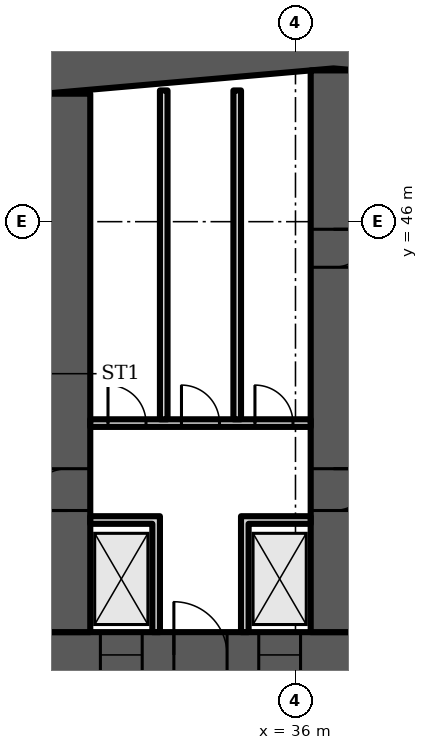
"""IFC4 building model, lengths in metres.
Left out: names, types, materials, properties, quantities, classifications, styles, units other than length and angle.
Written with IfcOpenShell. Run it as: python <this file> out.ifc"""

import sys

from ifc_helpers import new_model, si_unit, direction, frame, frame_2d, origin, place, context, subcontext, project, spatial, polyline, rectangle, outline, extrude, element, fill, save


model = new_model("IFC4")
c1 = context("Model", 3, precision=1e-05, world=origin(), true_north=direction((0.0, 1.0)))
c2 = subcontext(c1, "Body", "Model", "MODEL_VIEW")
j1 = project(units=[si_unit("LENGTHUNIT", "METRE"), si_unit("PLANEANGLEUNIT", "RADIAN")], contexts=[c1])
p1 = place(None, origin())
s1 = spatial("IfcSite", under=j1, at=p1, CompositionType="ELEMENT")
p2 = place(p1, origin())
s2 = spatial("IfcBuilding", under=s1, at=p2, CompositionType="ELEMENT")
p3 = place(p2, frame((0.0, 0.0, 63.1)))
s3 = spatial("IfcBuildingStorey", under=s2, at=p3, CompositionType="ELEMENT", Elevation=63.1)
p4 = place(p3, frame((0.0, 0.0, -0.0)))
e1 = element("IfcWall", 1, at=p4, inside=s3, PredefinedType="SHEAR", context=c2, shape_type="SweptSolid", body=[
    extrude(outline(polyline([(9.0, 47.583), (37.0, 50.032), (65.0, 47.583), (65.0, 48.787), (37.0, 51.237), (9.0, 48.787), (9.0, 47.583)])), origin(), (0.0, 0.0, 1.0), 3.6),
])
p5 = place(p3, frame((9.0, 34.6, 0.0), z_axis=(0.0, 0.0, 1.0), x_axis=(1.0, 0.0, 0.0)))
e2 = element("IfcWall", 2, at=p5, inside=s3, PredefinedType="SHEAR", context=c2, shape_type="SweptSolid", body=[
    extrude(rectangle(XDim=56.0, YDim=1.2, at=frame_2d((28.0, 0.0))), origin(), (0.0, 0.0, 1.0), 3.6),
])
p6 = place(p5, frame((3.3, 0.0, 0.0)))
e3 = element("IfcOpeningElement", 3, at=p6, cuts=e2, PredefinedType="OPENING", context=c2, shape_type="SweptSolid", body=[
    extrude(rectangle(XDim=1.0, YDim=2.1, at=frame_2d((0.5, 1.05))), frame((0.0, 0.61, 0.0), z_axis=(0.0, -1.0, 0.0), x_axis=(1.0, 0.0, 0.0)), (0.0, 0.0, 1.0), 1.22),
])
p7 = place(p5, frame((7.867, 0.0, 0.0)))
e4 = element("IfcOpeningElement", 4, at=p7, cuts=e2, PredefinedType="OPENING", context=c2, shape_type="SweptSolid", body=[
    extrude(rectangle(XDim=1.1, YDim=2.1, at=frame_2d((0.55, 1.05))), frame((0.0, 0.61, 0.0), z_axis=(0.0, -1.0, 0.0), x_axis=(1.0, 0.0, 0.0)), (0.0, 0.0, 1.0), 1.22),
])
p8 = place(p5, frame((12.033, 0.0, 0.0)))
e5 = element("IfcOpeningElement", 5, at=p8, cuts=e2, PredefinedType="OPENING", context=c2, shape_type="SweptSolid", body=[
    extrude(rectangle(XDim=1.1, YDim=2.1, at=frame_2d((0.55, 1.05))), frame((0.0, 0.61, 0.0), z_axis=(0.0, -1.0, 0.0), x_axis=(1.0, 0.0, 0.0)), (0.0, 0.0, 1.0), 1.22),
])
p9 = place(p5, frame((9.8, 0.0, 0.0)))
e6 = element("IfcOpeningElement", 6, at=p9, cuts=e2, PredefinedType="OPENING", context=c2, shape_type="SweptSolid", body=[
    extrude(rectangle(XDim=1.4, YDim=2.1, at=frame_2d((0.7, 1.05))), frame((0.0, 0.61, 0.0), z_axis=(0.0, -1.0, 0.0), x_axis=(1.0, 0.0, 0.0)), (0.0, 0.0, 1.0), 1.22),
])
p10 = place(p5, frame((14.65, 0.0, 0.0)))
e7 = element("IfcOpeningElement", 7, at=p10, cuts=e2, PredefinedType="OPENING", context=c2, shape_type="SweptSolid", body=[
    extrude(rectangle(XDim=1.2, YDim=2.1, at=frame_2d((0.6, 1.05))), frame((0.0, 0.61, 0.0), z_axis=(0.0, -1.0, 0.0), x_axis=(1.0, 0.0, 0.0)), (0.0, 0.0, 1.0), 1.22),
])
p11 = place(p5, frame((21.867, 0.0, 0.0)))
e8 = element("IfcOpeningElement", 8, at=p11, cuts=e2, PredefinedType="OPENING", context=c2, shape_type="SweptSolid", body=[
    extrude(rectangle(XDim=1.1, YDim=2.1, at=frame_2d((0.55, 1.05))), frame((0.0, 0.61, 0.0), z_axis=(0.0, -1.0, 0.0), x_axis=(1.0, 0.0, 0.0)), (0.0, 0.0, 1.0), 1.22),
])
p12 = place(p5, frame((26.033, 0.0, 0.0)))
e9 = element("IfcOpeningElement", 9, at=p12, cuts=e2, PredefinedType="OPENING", context=c2, shape_type="SweptSolid", body=[
    extrude(rectangle(XDim=1.1, YDim=2.1, at=frame_2d((0.55, 1.05))), frame((0.0, 0.61, 0.0), z_axis=(0.0, -1.0, 0.0), x_axis=(1.0, 0.0, 0.0)), (0.0, 0.0, 1.0), 1.22),
])
p13 = place(p5, frame((23.8, 0.0, 0.0)))
e10 = element("IfcOpeningElement", 10, at=p13, cuts=e2, PredefinedType="OPENING", context=c2, shape_type="SweptSolid", body=[
    extrude(rectangle(XDim=1.4, YDim=2.1, at=frame_2d((0.7, 1.05))), frame((0.0, 0.61, 0.0), z_axis=(0.0, -1.0, 0.0), x_axis=(1.0, 0.0, 0.0)), (0.0, 0.0, 1.0), 1.22),
])
p14 = place(p5, frame((28.867, 0.0, 0.0)))
e11 = element("IfcOpeningElement", 11, at=p14, cuts=e2, PredefinedType="OPENING", context=c2, shape_type="SweptSolid", body=[
    extrude(rectangle(XDim=1.1, YDim=2.1, at=frame_2d((0.55, 1.05))), frame((0.0, 0.61, 0.0), z_axis=(0.0, -1.0, 0.0), x_axis=(1.0, 0.0, 0.0)), (0.0, 0.0, 1.0), 1.22),
])
p15 = place(p5, frame((33.033, 0.0, 0.0)))
e12 = element("IfcOpeningElement", 12, at=p15, cuts=e2, PredefinedType="OPENING", context=c2, shape_type="SweptSolid", body=[
    extrude(rectangle(XDim=1.1, YDim=2.1, at=frame_2d((0.55, 1.05))), frame((0.0, 0.61, 0.0), z_axis=(0.0, -1.0, 0.0), x_axis=(1.0, 0.0, 0.0)), (0.0, 0.0, 1.0), 1.22),
])
p16 = place(p5, frame((40.15, 0.0, 0.0)))
e13 = element("IfcOpeningElement", 13, at=p16, cuts=e2, PredefinedType="OPENING", context=c2, shape_type="SweptSolid", body=[
    extrude(rectangle(XDim=1.2, YDim=2.1, at=frame_2d((0.6, 1.05))), frame((0.0, 0.61, 0.0), z_axis=(0.0, -1.0, 0.0), x_axis=(1.0, 0.0, 0.0)), (0.0, 0.0, 1.0), 1.22),
])
p17 = place(p5, frame((44.8, 0.0, 0.0)))
e14 = element("IfcOpeningElement", 14, at=p17, cuts=e2, PredefinedType="OPENING", context=c2, shape_type="SweptSolid", body=[
    extrude(rectangle(XDim=1.4, YDim=2.1, at=frame_2d((0.7, 1.05))), frame((0.0, 0.61, 0.0), z_axis=(0.0, -1.0, 0.0), x_axis=(1.0, 0.0, 0.0)), (0.0, 0.0, 1.0), 1.22),
])
p18 = place(p5, frame((49.867, 0.0, 0.0)))
e15 = element("IfcOpeningElement", 15, at=p18, cuts=e2, PredefinedType="OPENING", context=c2, shape_type="SweptSolid", body=[
    extrude(rectangle(XDim=1.1, YDim=2.1, at=frame_2d((0.55, 1.05))), frame((0.0, 0.61, 0.0), z_axis=(0.0, -1.0, 0.0), x_axis=(1.0, 0.0, 0.0)), (0.0, 0.0, 1.0), 1.22),
])
p19 = place(p5, frame((53.5, 0.0, 0.0)))
e16 = element("IfcOpeningElement", 16, at=p19, cuts=e2, PredefinedType="OPENING", context=c2, shape_type="SweptSolid", body=[
    extrude(rectangle(XDim=1.1, YDim=2.1, at=frame_2d((0.55, 1.05))), frame((0.0, 0.61, 0.0), z_axis=(0.0, -1.0, 0.0), x_axis=(1.0, 0.0, 0.0)), (0.0, 0.0, 1.0), 1.22),
])
p20 = place(p5, frame((51.567, 0.0, 0.0)))
e17 = element("IfcOpeningElement", 17, at=p20, cuts=e2, PredefinedType="OPENING", context=c2, shape_type="SweptSolid", body=[
    extrude(rectangle(XDim=1.4, YDim=2.1, at=frame_2d((0.7, 1.05))), frame((0.0, 0.61, 0.0), z_axis=(0.0, -1.0, 0.0), x_axis=(1.0, 0.0, 0.0)), (0.0, 0.0, 1.0), 1.22),
])
p21 = place(p3, frame((30.0, 35.2, 0.0), z_axis=(0.0, 0.0, 1.0), x_axis=(0.0, 1.0, 0.0)))
e18 = element("IfcWall", 18, at=p21, inside=s3, PredefinedType="SHEAR", context=c2, shape_type="SweptSolid", body=[
    extrude(rectangle(XDim=14.168, YDim=1.2, at=frame_2d((7.084, 0.0))), origin(), (0.0, 0.0, 1.0), 3.6),
])
p22 = place(p21, frame((3.2, 0.0, 0.0)))
e19 = element("IfcOpeningElement", 19, at=p22, cuts=e18, PredefinedType="OPENING", context=c2, shape_type="SweptSolid", body=[
    extrude(rectangle(XDim=1.1, YDim=2.1, at=frame_2d((0.55, 1.05))), frame((0.0, 0.61, 0.0), z_axis=(0.0, -1.0, 0.0), x_axis=(1.0, 0.0, 0.0)), (0.0, 0.0, 1.0), 1.22),
])
p23 = place(p3, frame((37.0, 35.2, 0.0), z_axis=(0.0, 0.0, 1.0), x_axis=(0.0, 1.0, 0.0)))
e20 = element("IfcWall", 20, at=p23, inside=s3, PredefinedType="SHEAR", context=c2, shape_type="SweptSolid", body=[
    extrude(rectangle(XDim=14.78, YDim=1.2, at=frame_2d((7.39, 0.0))), origin(), (0.0, 0.0, 1.0), 3.6),
])
p24 = place(p23, frame((3.2, 0.0, 0.0)))
e21 = element("IfcOpeningElement", 21, at=p24, cuts=e20, PredefinedType="OPENING", context=c2, shape_type="SweptSolid", body=[
    extrude(rectangle(XDim=1.1, YDim=2.1, at=frame_2d((0.55, 1.05))), frame((0.0, 0.61, 0.0), z_axis=(0.0, -1.0, 0.0), x_axis=(1.0, 0.0, 0.0)), (0.0, 0.0, 1.0), 1.22),
])
p25 = place(p23, frame((9.6, 0.0, 0.0)))
e22 = element("IfcOpeningElement", 22, at=p25, cuts=e20, PredefinedType="OPENING", context=c2, shape_type="SweptSolid", body=[
    extrude(rectangle(XDim=1.0, YDim=2.1, at=frame_2d((0.5, 1.05))), frame((0.0, 0.61, 0.0), z_axis=(0.0, -1.0, 0.0), x_axis=(1.0, 0.0, 0.0)), (0.0, 0.0, 1.0), 1.22),
])
p26 = place(p3, frame((30.6, 40.7, 0.0), z_axis=(0.0, 0.0, 1.0), x_axis=(1.0, 0.0, 0.0)))
e23 = element("IfcWall", 23, at=p26, inside=s3, PredefinedType="PARTITIONING", context=c2, shape_type="SweptSolid", body=[
    extrude(rectangle(XDim=5.8, YDim=0.2, at=frame_2d((2.9, 0.0))), origin(), (0.0, 0.0, 1.0), 3.2),
])
p27 = place(p26, frame((0.467, 0.0, 0.0)))
e24 = element("IfcOpeningElement", 24, at=p27, cuts=e23, PredefinedType="OPENING", context=c2, shape_type="SweptSolid", body=[
    extrude(rectangle(XDim=1.0, YDim=2.1, at=frame_2d((0.5, 1.05))), frame((0.0, 0.11, 0.0), z_axis=(0.0, -1.0, 0.0), x_axis=(1.0, 0.0, 0.0)), (0.0, 0.0, 1.0), 0.22),
])
p28 = place(p26, frame((2.4, 0.0, 0.0)))
e25 = element("IfcOpeningElement", 25, at=p28, cuts=e23, PredefinedType="OPENING", context=c2, shape_type="SweptSolid", body=[
    extrude(rectangle(XDim=1.0, YDim=2.1, at=frame_2d((0.5, 1.05))), frame((0.0, 0.11, 0.0), z_axis=(0.0, -1.0, 0.0), x_axis=(1.0, 0.0, 0.0)), (0.0, 0.0, 1.0), 0.22),
])
p29 = place(p26, frame((4.333, 0.0, 0.0)))
e26 = element("IfcOpeningElement", 26, at=p29, cuts=e23, PredefinedType="OPENING", context=c2, shape_type="SweptSolid", body=[
    extrude(rectangle(XDim=1.0, YDim=2.1, at=frame_2d((0.5, 1.05))), frame((0.0, 0.11, 0.0), z_axis=(0.0, -1.0, 0.0), x_axis=(1.0, 0.0, 0.0)), (0.0, 0.0, 1.0), 0.22),
])
p30 = place(p3, frame((0.0, 0.0, -0.0)))
e27 = element("IfcWall", 27, at=p30, inside=s3, PredefinedType="PARTITIONING", context=c2, shape_type="SweptSolid", body=[
    extrude(outline(polyline([(32.233, 38.05), (30.6, 38.05), (30.6, 38.25), (32.233, 38.25), (32.433, 38.25), (32.433, 35.2), (32.233, 35.2), (32.233, 38.05)])), origin(), (0.0, 0.0, 1.0), 3.2),
])
p31 = place(p3, frame((0.0, 0.0, -0.0)))
e28 = element("IfcWall", 28, at=p31, inside=s3, PredefinedType="PARTITIONING", context=c2, shape_type="SweptSolid", body=[
    extrude(outline(polyline([(34.567, 38.25), (34.767, 38.25), (36.4, 38.25), (36.4, 38.05), (34.767, 38.05), (34.767, 35.2), (34.567, 35.2), (34.567, 38.25)])), origin(), (0.0, 0.0, 1.0), 3.2),
])
for number, where, z_axis, x_axis in (
    (29, (32.533, 40.8, 0.0), (0.0, 0.0, 1.0), (0.0, 1.0, 0.0)),
    (30, (34.467, 40.8, 0.0), (0.0, 0.0, 1.0), (0.0, 1.0, 0.0)),
):
    element("IfcWall", number, at=place(p3, frame(where, z_axis=z_axis, x_axis=x_axis)), inside=s3, PredefinedType="PARTITIONING", context=c2, shape_type="SweptSolid", body=[
        extrude(rectangle(XDim=8.653, YDim=0.2, at=frame_2d((4.326, 0.0))), origin(), (0.0, 0.0, 1.0), 3.2),
    ])
p32 = place(p11, origin())
e31 = element("IfcDoor", 31, at=p32, inside=s3, OperationType="DOUBLE_DOOR_SLIDING", PredefinedType="DOOR", context=c2, shape_type="SweptSolid", body=[
    extrude(rectangle(XDim=1.1, YDim=2.1, at=frame_2d((0.55, 1.05))), frame((0.0, 0.025, 0.0), z_axis=(0.0, -1.0, 0.0), x_axis=(1.0, 0.0, 0.0)), (0.0, 0.0, 1.0), 0.05),
])
fill(e8, e31)
p33 = place(p12, origin())
e32 = element("IfcDoor", 32, at=p33, inside=s3, OperationType="DOUBLE_DOOR_SLIDING", PredefinedType="DOOR", context=c2, shape_type="SweptSolid", body=[
    extrude(rectangle(XDim=1.1, YDim=2.1, at=frame_2d((0.55, 1.05))), frame((0.0, 0.025, 0.0), z_axis=(0.0, -1.0, 0.0), x_axis=(1.0, 0.0, 0.0)), (0.0, 0.0, 1.0), 0.05),
])
fill(e9, e32)
p34 = place(p13, origin())
e33 = element("IfcDoor", 33, at=p34, inside=s3, OperationType="DOUBLE_DOOR_SINGLE_SWING", PredefinedType="DOOR", context=c2, shape_type="SweptSolid", body=[
    extrude(rectangle(XDim=1.4, YDim=2.1, at=frame_2d((0.7, 1.05))), frame((0.0, 0.025, 0.0), z_axis=(0.0, -1.0, 0.0), x_axis=(1.0, 0.0, 0.0)), (0.0, 0.0, 1.0), 0.05),
])
fill(e10, e33)
p35 = place(p27, origin())
e34 = element("IfcDoor", 34, at=p35, inside=s3, OperationType="SINGLE_SWING_LEFT", PredefinedType="DOOR", context=c2, shape_type="SweptSolid", body=[
    extrude(rectangle(XDim=1.0, YDim=2.1, at=frame_2d((0.5, 1.05))), frame((0.0, 0.025, 0.0), z_axis=(0.0, -1.0, 0.0), x_axis=(1.0, 0.0, 0.0)), (0.0, 0.0, 1.0), 0.05),
])
fill(e24, e34)
p36 = place(p28, origin())
e35 = element("IfcDoor", 35, at=p36, inside=s3, OperationType="SINGLE_SWING_LEFT", PredefinedType="DOOR", context=c2, shape_type="SweptSolid", body=[
    extrude(rectangle(XDim=1.0, YDim=2.1, at=frame_2d((0.5, 1.05))), frame((0.0, 0.025, 0.0), z_axis=(0.0, -1.0, 0.0), x_axis=(1.0, 0.0, 0.0)), (0.0, 0.0, 1.0), 0.05),
])
fill(e25, e35)
p37 = place(p29, origin())
e36 = element("IfcDoor", 36, at=p37, inside=s3, OperationType="SINGLE_SWING_LEFT", PredefinedType="DOOR", context=c2, shape_type="SweptSolid", body=[
    extrude(rectangle(XDim=1.0, YDim=2.1, at=frame_2d((0.5, 1.05))), frame((0.0, 0.025, 0.0), z_axis=(0.0, -1.0, 0.0), x_axis=(1.0, 0.0, 0.0)), (0.0, 0.0, 1.0), 0.05),
])
fill(e26, e36)
p38 = place(p22, origin())
e37 = element("IfcDoor", 37, at=p38, inside=s3, OperationType="SINGLE_SWING_LEFT", PredefinedType="DOOR", context=c2, shape_type="SweptSolid", body=[
    extrude(rectangle(XDim=1.1, YDim=2.1, at=frame_2d((0.55, 1.05))), frame((0.0, 0.025, 0.0), z_axis=(0.0, -1.0, 0.0), x_axis=(1.0, 0.0, 0.0)), (0.0, 0.0, 1.0), 0.05),
])
fill(e19, e37)
p39 = place(p24, origin())
e38 = element("IfcDoor", 38, at=p39, inside=s3, OperationType="SINGLE_SWING_RIGHT", PredefinedType="DOOR", context=c2, shape_type="SweptSolid", body=[
    extrude(rectangle(XDim=1.1, YDim=2.1, at=frame_2d((0.55, 1.05))), frame((0.0, 0.025, 0.0), z_axis=(0.0, -1.0, 0.0), x_axis=(1.0, 0.0, 0.0)), (0.0, 0.0, 1.0), 0.05),
])
fill(e21, e38)
p40 = place(p25, origin())
e39 = element("IfcDoor", 39, at=p40, inside=s3, OperationType="SINGLE_SWING_RIGHT", PredefinedType="DOOR", context=c2, shape_type="SweptSolid", body=[
    extrude(rectangle(XDim=1.0, YDim=2.1, at=frame_2d((0.5, 1.05))), frame((0.0, 0.6, 0.0), z_axis=(0.0, -1.0, 0.0), x_axis=(1.0, 0.0, 0.0)), (0.0, 0.0, 1.0), 1.199),
])
fill(e22, e39)
save(model, sys.argv[1])
